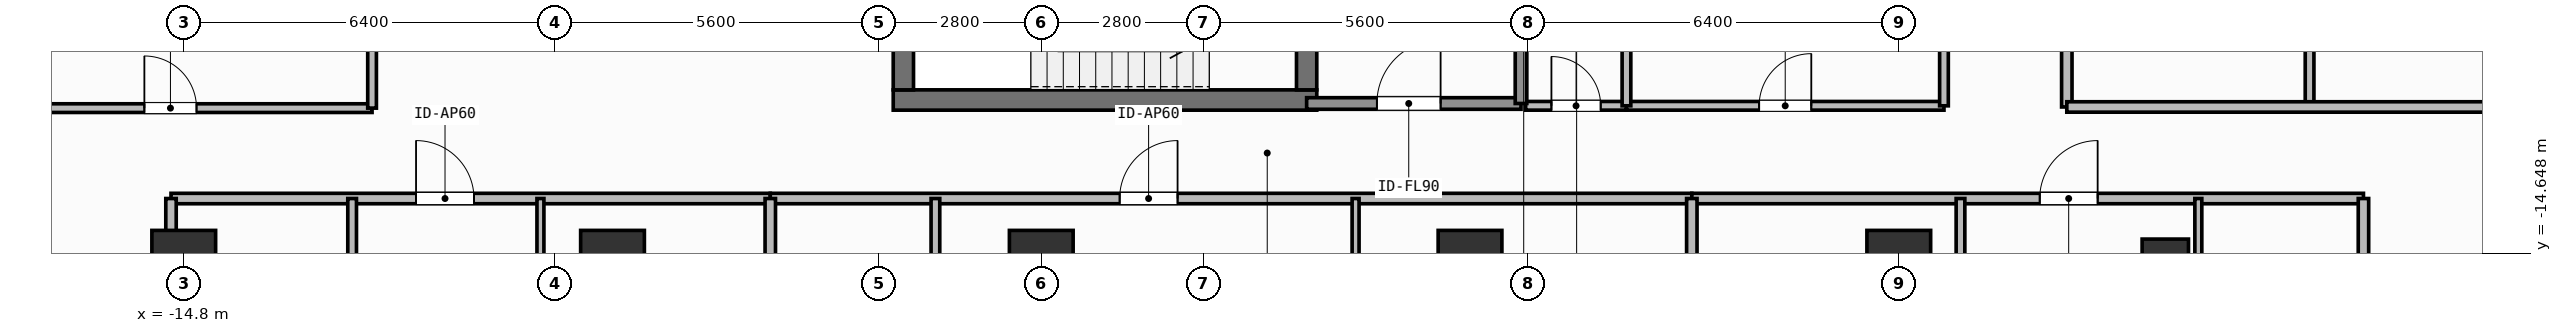
"""IFC4 building model, lengths in metres.
Left out: names, types, materials, properties, quantities, classifications, styles, units other than length and angle.
Written with IfcOpenShell. Run it as: python <this file> out.ifc"""

import sys

from ifc_helpers import new_model, si_unit, direction, frame, frame_2d, origin, origin_2d, place, context, subcontext, project, spatial, rectangle, hollow_rectangle, extrude, element, fill, save


model = new_model("IFC4")
c1 = context("Model", 3, precision=1e-05, world=origin(), true_north=direction((0.0, 1.0)))
c2 = subcontext(c1, "Body", "Model", "MODEL_VIEW")
j1 = project(units=[si_unit("LENGTHUNIT", "METRE"), si_unit("PLANEANGLEUNIT", "RADIAN")], contexts=[c1])
p1 = place(None, origin())
s1 = spatial("IfcSite", under=j1, at=p1, CompositionType="ELEMENT")
p2 = place(p1, origin())
s2 = spatial("IfcBuilding", under=s1, at=p2, CompositionType="ELEMENT")
p3 = place(p2, frame((0.0, 0.0, 227.4)))
s3 = spatial("IfcBuildingStorey", under=s2, at=p3, CompositionType="ELEMENT", Elevation=227.4)
p4 = place(p3, frame((-2.555, -12.0, 0.0), z_axis=(0.0, 0.0, 1.0), x_axis=(1.0, 0.0, 0.0)))
e1 = element("IfcWall", 1, at=p4, inside=s3, PredefinedType="SHEAR", context=c2, shape_type="SweptSolid", body=[
    extrude(rectangle(XDim=7.31, YDim=0.35, at=frame_2d((3.655, 0.0))), origin(), (0.0, 0.0, 1.0), 3.9),
])
p5 = place(p3, frame((-2.38, -11.825, 0.0), z_axis=(0.0, 0.0, 1.0), x_axis=(0.0, 1.0, 0.0)))
e2 = element("IfcWall", 2, at=p5, inside=s3, PredefinedType="SHEAR", context=c2, shape_type="SweptSolid", body=[
    extrude(rectangle(XDim=2.925, YDim=0.35, at=frame_2d((1.462, 0.0))), origin(), (0.0, 0.0, 1.0), 3.9),
])
p6 = place(p3, frame((4.58, -8.9, 0.0), z_axis=(0.0, 0.0, 1.0), x_axis=(0.0, -1.0, 0.0)))
e3 = element("IfcWall", 3, at=p6, inside=s3, PredefinedType="SHEAR", context=c2, shape_type="SweptSolid", body=[
    extrude(rectangle(XDim=2.925, YDim=0.35, at=frame_2d((1.462, 0.0))), origin(), (0.0, 0.0, 1.0), 3.9),
])
p7 = place(p6, frame((0.913, 0.0, 0.0)))
e4 = element("IfcOpeningElement", 4, at=p7, cuts=e3, PredefinedType="OPENING", context=c2, shape_type="SweptSolid", body=[
    extrude(rectangle(XDim=1.1, YDim=2.15, at=frame_2d((0.55, 1.075))), frame((0.0, 0.185, 0.0), z_axis=(0.0, -1.0, 0.0), x_axis=(1.0, 0.0, 0.0)), (0.0, 0.0, 1.0), 0.37),
])
for number, where, z_axis, x_axis in (
    (5, (-14.8, -14.8, 0.0), (0.0, 0.0, 1.0), (1.0, 0.0, 0.0)),
    (6, (-7.4, -14.8, 0.0), (0.0, 0.0, 1.0), (1.0, 0.0, 0.0)),
    (7, (0.0, -14.8, 0.0), (0.0, 0.0, 1.0), (1.0, 0.0, 0.0)),
    (8, (7.4, -14.8, 0.0), (0.0, 0.0, 1.0), (1.0, 0.0, 0.0)),
    (9, (14.8, -14.8, 0.0), (0.0, 0.0, 1.0), (1.0, 0.0, 0.0)),
):
    element("IfcColumn", number, at=place(p3, frame(where, z_axis=z_axis, x_axis=x_axis)), inside=s3, PredefinedType="COLUMN", context=c2, shape_type="SweptSolid", body=[
        extrude(rectangle(XDim=1.1, YDim=1.1, at=origin_2d()), origin(), (0.0, 0.0, 1.0), 3.9),
    ])
p8 = place(p3, frame((19.4, -14.8, 0.0), z_axis=(0.0, 0.0, 1.0), x_axis=(1.0, 0.0, 0.0)))
e10 = element("IfcColumn", 10, at=p8, inside=s3, PredefinedType="COLUMN", context=c2, shape_type="SweptSolid", body=[
    extrude(hollow_rectangle(XDim=0.8, YDim=0.8, WallThickness=0.036, at=origin_2d()), origin(), (0.0, 0.0, 1.0), 3.9),
])
p9 = place(p3, frame((4.58, -12.06, 0.0), z_axis=(0.0, 0.0, 1.0), x_axis=(1.0, 0.0, 0.0)))
e11 = element("IfcWall", 11, at=p9, inside=s3, PredefinedType="SOLIDWALL", context=c2, shape_type="SweptSolid", body=[
    extrude(rectangle(XDim=3.7, YDim=0.2, at=frame_2d((1.85, 0.0))), origin(), (0.0, 0.0, 1.0), 3.68),
])
p10 = place(p9, frame((1.212, 0.0, 0.0)))
e12 = element("IfcOpeningElement", 12, at=p10, cuts=e11, PredefinedType="OPENING", context=c2, shape_type="SweptSolid", body=[
    extrude(rectangle(XDim=1.1, YDim=2.15, at=frame_2d((0.55, 1.075))), frame((0.0, 0.11, 0.0), z_axis=(0.0, -1.0, 0.0), x_axis=(1.0, 0.0, 0.0)), (0.0, 0.0, 1.0), 0.22),
])
p11 = place(p3, frame((8.36, -12.1, 0.0), z_axis=(0.0, 0.0, 1.0), x_axis=(1.0, 0.0, 0.0)))
e13 = element("IfcWall", 13, at=p11, inside=s3, PredefinedType="PARTITIONING", context=c2, shape_type="SweptSolid", body=[
    extrude(rectangle(XDim=1.74, YDim=0.15, at=frame_2d((0.87, 0.0))), origin(), (0.0, 0.0, 1.0), 3.68),
])
p12 = place(p11, frame((0.445, 0.0, 0.0)))
e14 = element("IfcOpeningElement", 14, at=p12, cuts=e13, PredefinedType="OPENING", context=c2, shape_type="SweptSolid", body=[
    extrude(rectangle(XDim=0.85, YDim=2.1, at=frame_2d((0.425, 1.05))), frame((0.0, 0.085, 0.0), z_axis=(0.0, -1.0, 0.0), x_axis=(1.0, 0.0, 0.0)), (0.0, 0.0, 1.0), 0.17),
])
p13 = place(p3, frame((10.1, -12.1, 0.0), z_axis=(0.0, 0.0, 1.0), x_axis=(1.0, 0.0, 0.0)))
e15 = element("IfcWall", 15, at=p13, inside=s3, PredefinedType="PARTITIONING", context=c2, shape_type="SweptSolid", body=[
    extrude(rectangle(XDim=5.48, YDim=0.15, at=frame_2d((2.74, 0.0))), origin(), (0.0, 0.0, 1.0), 3.68),
])
p14 = place(p13, frame((2.29, 0.0, 0.0)))
e16 = element("IfcOpeningElement", 16, at=p14, cuts=e15, PredefinedType="OPENING", context=c2, shape_type="SweptSolid", body=[
    extrude(rectangle(XDim=0.9, YDim=2.1, at=frame_2d((0.45, 1.05))), frame((0.0, 0.085, 0.0), z_axis=(0.0, -1.0, 0.0), x_axis=(1.0, 0.0, 0.0)), (0.0, 0.0, 1.0), 0.17),
])
p15 = place(p3, frame((-15.02, -13.7, 0.0), z_axis=(0.0, 0.0, 1.0), x_axis=(1.0, 0.0, 0.0)))
e17 = element("IfcWall", 17, at=p15, inside=s3, PredefinedType="PARTITIONING", context=c2, shape_type="SweptSolid", body=[
    extrude(rectangle(XDim=10.343, YDim=0.18, at=frame_2d((5.171, 0.0))), origin(), (0.0, 0.0, 1.0), 3.68),
])
p16 = place(p15, frame((4.229, 0.0, 0.0)))
e18 = element("IfcOpeningElement", 18, at=p16, cuts=e17, PredefinedType="OPENING", context=c2, shape_type="SweptSolid", body=[
    extrude(rectangle(XDim=1.0, YDim=2.2, at=frame_2d((0.5, 1.1))), frame((0.0, 0.1, 0.0), z_axis=(0.0, -1.0, 0.0), x_axis=(1.0, 0.0, 0.0)), (0.0, 0.0, 1.0), 0.2),
])
p17 = place(p3, frame((-11.894, -24.39, 0.0), z_axis=(0.0, 0.0, 1.0), x_axis=(0.0, 1.0, 0.0)))
e19 = element("IfcWall", 19, at=p17, inside=s3, PredefinedType="PARTITIONING", context=c2, shape_type="SweptSolid", body=[
    extrude(rectangle(XDim=10.69, YDim=0.15, at=frame_2d((5.345, 0.0))), origin(), (0.0, 0.0, 1.0), 3.68),
])
p18 = place(p17, frame((4.83, 0.0, 0.0)))
e20 = element("IfcOpeningElement", 20, at=p18, cuts=e19, PredefinedType="OPENING", context=c2, shape_type="SweptSolid", body=[
    extrude(rectangle(XDim=0.85, YDim=2.1, at=frame_2d((0.425, 1.05))), frame((0.0, 0.085, 0.0), z_axis=(0.0, -1.0, 0.0), x_axis=(1.0, 0.0, 0.0)), (0.0, 0.0, 1.0), 0.17),
])
p19 = place(p3, frame((-8.644, -18.19, 0.0), z_axis=(0.0, 0.0, 1.0), x_axis=(0.0, 1.0, 0.0)))
e21 = element("IfcWall", 21, at=p19, inside=s3, PredefinedType="PARTITIONING", context=c2, shape_type="SweptSolid", body=[
    extrude(rectangle(XDim=4.49, YDim=0.12, at=frame_2d((2.245, 0.0))), origin(), (0.0, 0.0, 1.0), 3.68),
])
p20 = place(p19, frame((1.907, 0.0, 0.0)))
e22 = element("IfcOpeningElement", 22, at=p20, cuts=e21, PredefinedType="OPENING", context=c2, shape_type="SweptSolid", body=[
    extrude(rectangle(XDim=0.85, YDim=2.1, at=frame_2d((0.425, 1.05))), frame((0.0, 0.07, 0.0), z_axis=(0.0, -1.0, 0.0), x_axis=(1.0, 0.0, 0.0)), (0.0, 0.0, 1.0), 0.14),
])
p21 = place(p3, frame((-4.677, -13.7, 0.0), z_axis=(0.0, 0.0, 1.0), x_axis=(1.0, 0.0, 0.0)))
e23 = element("IfcWall", 23, at=p21, inside=s3, PredefinedType="PARTITIONING", context=c2, shape_type="SweptSolid", body=[
    extrude(rectangle(XDim=15.905, YDim=0.18, at=frame_2d((7.953, 0.0))), origin(), (0.0, 0.0, 1.0), 3.68),
])
p22 = place(p21, frame((6.03, 0.0, 0.0)))
e24 = element("IfcOpeningElement", 24, at=p22, cuts=e23, PredefinedType="OPENING", context=c2, shape_type="SweptSolid", body=[
    extrude(rectangle(XDim=1.0, YDim=2.2, at=frame_2d((0.5, 1.1))), frame((0.0, 0.1, 0.0), z_axis=(0.0, -1.0, 0.0), x_axis=(1.0, 0.0, 0.0)), (0.0, 0.0, 1.0), 0.2),
])
p23 = place(p3, frame((-1.827, -24.39, 0.0), z_axis=(0.0, 0.0, 1.0), x_axis=(0.0, 1.0, 0.0)))
e25 = element("IfcWall", 25, at=p23, inside=s3, PredefinedType="PARTITIONING", context=c2, shape_type="SweptSolid", body=[
    extrude(rectangle(XDim=10.69, YDim=0.15, at=frame_2d((5.345, 0.0))), origin(), (0.0, 0.0, 1.0), 3.68),
])
p24 = place(p23, frame((4.83, 0.0, 0.0)))
e26 = element("IfcOpeningElement", 26, at=p24, cuts=e25, PredefinedType="OPENING", context=c2, shape_type="SweptSolid", body=[
    extrude(rectangle(XDim=0.85, YDim=2.1, at=frame_2d((0.425, 1.05))), frame((0.0, 0.085, 0.0), z_axis=(0.0, -1.0, 0.0), x_axis=(1.0, 0.0, 0.0)), (0.0, 0.0, 1.0), 0.17),
])
p25 = place(p3, frame((5.425, -18.19, 0.0), z_axis=(0.0, 0.0, 1.0), x_axis=(0.0, 1.0, 0.0)))
e27 = element("IfcWall", 27, at=p25, inside=s3, PredefinedType="PARTITIONING", context=c2, shape_type="SweptSolid", body=[
    extrude(rectangle(XDim=4.49, YDim=0.12, at=frame_2d((2.245, 0.0))), origin(), (0.0, 0.0, 1.0), 3.68),
])
p26 = place(p25, frame((1.907, 0.0, 0.0)))
e28 = element("IfcOpeningElement", 28, at=p26, cuts=e27, PredefinedType="OPENING", context=c2, shape_type="SweptSolid", body=[
    extrude(rectangle(XDim=0.85, YDim=2.1, at=frame_2d((0.425, 1.05))), frame((0.0, 0.07, 0.0), z_axis=(0.0, -1.0, 0.0), x_axis=(1.0, 0.0, 0.0)), (0.0, 0.0, 1.0), 0.14),
])
p27 = place(p3, frame((11.228, -13.7, 0.0), z_axis=(0.0, 0.0, 1.0), x_axis=(1.0, 0.0, 0.0)))
e29 = element("IfcWall", 29, at=p27, inside=s3, PredefinedType="PARTITIONING", context=c2, shape_type="SweptSolid", body=[
    extrude(rectangle(XDim=11.592, YDim=0.18, at=frame_2d((5.796, 0.0))), origin(), (0.0, 0.0, 1.0), 3.68),
])
p28 = place(p27, frame((6.004, 0.0, 0.0)))
e30 = element("IfcOpeningElement", 30, at=p28, cuts=e29, PredefinedType="OPENING", context=c2, shape_type="SweptSolid", body=[
    extrude(rectangle(XDim=1.0, YDim=2.2, at=frame_2d((0.5, 1.1))), frame((0.0, 0.1, 0.0), z_axis=(0.0, -1.0, 0.0), x_axis=(1.0, 0.0, 0.0)), (0.0, 0.0, 1.0), 0.2),
])
p29 = place(p3, frame((15.865, -18.19, 0.0), z_axis=(0.0, 0.0, 1.0), x_axis=(0.0, 1.0, 0.0)))
e31 = element("IfcWall", 31, at=p29, inside=s3, PredefinedType="PARTITIONING", context=c2, shape_type="SweptSolid", body=[
    extrude(rectangle(XDim=4.49, YDim=0.15, at=frame_2d((2.245, 0.0))), origin(), (0.0, 0.0, 1.0), 3.68),
])
p30 = place(p29, frame((1.907, 0.0, 0.0)))
e32 = element("IfcOpeningElement", 32, at=p30, cuts=e31, PredefinedType="OPENING", context=c2, shape_type="SweptSolid", body=[
    extrude(rectangle(XDim=0.85, YDim=2.1, at=frame_2d((0.425, 1.05))), frame((0.0, 0.085, 0.0), z_axis=(0.0, -1.0, 0.0), x_axis=(1.0, 0.0, 0.0)), (0.0, 0.0, 1.0), 0.17),
])
p31 = place(p3, frame((19.97, -21.183, 0.0), z_axis=(0.0, 0.0, 1.0), x_axis=(0.0, 1.0, 0.0)))
e33 = element("IfcWall", 33, at=p31, inside=s3, PredefinedType="PARTITIONING", context=c2, shape_type="SweptSolid", body=[
    extrude(rectangle(XDim=7.483, YDim=0.12, at=frame_2d((3.742, 0.0))), origin(), (0.0, 0.0, 1.0), 3.68),
])
p32 = place(p31, frame((3.316, 0.0, 0.0)))
e34 = element("IfcOpeningElement", 34, at=p32, cuts=e33, PredefinedType="OPENING", context=c2, shape_type="SweptSolid", body=[
    extrude(rectangle(XDim=0.85, YDim=2.1, at=frame_2d((0.425, 1.05))), frame((0.0, 0.07, 0.0), z_axis=(0.0, -1.0, 0.0), x_axis=(1.0, 0.0, 0.0)), (0.0, 0.0, 1.0), 0.14),
])
p33 = place(p3, frame((-18.33, -12.14, 0.0), z_axis=(0.0, 0.0, 1.0), x_axis=(1.0, 0.0, 0.0)))
e35 = element("IfcWall", 35, at=p33, inside=s3, PredefinedType="PARTITIONING", context=c2, shape_type="SweptSolid", body=[
    extrude(rectangle(XDim=6.78, YDim=0.15, at=frame_2d((3.39, 0.0))), origin(), (0.0, 0.0, 1.0), 3.68),
])
p34 = place(p33, frame((2.85, 0.0, 0.0)))
e36 = element("IfcOpeningElement", 36, at=p34, cuts=e35, PredefinedType="OPENING", context=c2, shape_type="SweptSolid", body=[
    extrude(rectangle(XDim=0.9, YDim=2.1, at=frame_2d((0.45, 1.05))), frame((0.0, 0.085, 0.0), z_axis=(0.0, -1.0, 0.0), x_axis=(1.0, 0.0, 0.0)), (0.0, 0.0, 1.0), 0.17),
])
p35 = place(p3, frame((17.7, -12.12, 0.0), z_axis=(0.0, 0.0, 1.0), x_axis=(0.0, 1.0, 0.0)))
e37 = element("IfcWall", 37, at=p35, inside=s3, PredefinedType="PARTITIONING", context=c2, shape_type="SweptSolid", body=[
    extrude(rectangle(XDim=10.927, YDim=0.18, at=frame_2d((5.463, 0.0))), origin(), (0.0, 0.0, 1.0), 3.68),
])
p36 = place(p35, frame((5.319, 0.0, 0.0)))
e38 = element("IfcOpeningElement", 38, at=p36, cuts=e37, PredefinedType="OPENING", context=c2, shape_type="SweptSolid", body=[
    extrude(rectangle(XDim=1.0, YDim=2.2, at=frame_2d((0.5, 1.1))), frame((0.0, 0.1, 0.0), z_axis=(0.0, -1.0, 0.0), x_axis=(1.0, 0.0, 0.0)), (0.0, 0.0, 1.0), 0.2),
])
p37 = place(p3, frame((8.28, -12.06, 0.0), z_axis=(0.0, 0.0, 1.0), x_axis=(0.0, 1.0, 0.0)))
e39 = element("IfcWall", 39, at=p37, inside=s3, PredefinedType="SOLIDWALL", context=c2, shape_type="SweptSolid", body=[
    extrude(rectangle(XDim=3.26, YDim=0.2, at=frame_2d((1.63, 0.0))), origin(), (0.0, 0.0, 1.0), 3.68),
])
p38 = place(p3, frame((10.1, -12.1, 0.0), z_axis=(0.0, 0.0, 1.0), x_axis=(0.0, 1.0, 0.0)))
e40 = element("IfcWall", 40, at=p38, inside=s3, PredefinedType="PARTITIONING", context=c2, shape_type="SweptSolid", body=[
    extrude(rectangle(XDim=2.35, YDim=0.15, at=frame_2d((1.175, 0.0))), origin(), (0.0, 0.0, 1.0), 3.68),
])
p39 = place(p3, frame((15.58, -12.1, 0.0), z_axis=(0.0, 0.0, 1.0), x_axis=(0.0, 1.0, 0.0)))
e41 = element("IfcWall", 41, at=p39, inside=s3, PredefinedType="PARTITIONING", context=c2, shape_type="SweptSolid", body=[
    extrude(rectangle(XDim=6.25, YDim=0.15, at=frame_2d((3.125, 0.0))), origin(), (0.0, 0.0, 1.0), 3.68),
])
p40 = place(p3, frame((-4.677, -28.63, 0.0), z_axis=(0.0, 0.0, 1.0), x_axis=(0.0, 1.0, 0.0)))
e42 = element("IfcWall", 42, at=p40, inside=s3, PredefinedType="PARTITIONING", context=c2, shape_type="SweptSolid", body=[
    extrude(rectangle(XDim=14.93, YDim=0.18, at=frame_2d((7.465, 0.0))), origin(), (0.0, 0.0, 1.0), 3.68),
])
p41 = place(p3, frame((11.228, -28.63, 0.0), z_axis=(0.0, 0.0, 1.0), x_axis=(0.0, 1.0, 0.0)))
e43 = element("IfcWall", 43, at=p41, inside=s3, PredefinedType="PARTITIONING", context=c2, shape_type="SweptSolid", body=[
    extrude(rectangle(XDim=14.93, YDim=0.18, at=frame_2d((7.465, 0.0))), origin(), (0.0, 0.0, 1.0), 3.42),
])
for number, where, z_axis, x_axis in (
    (44, (-15.02, -27.51, 0.0), (0.0, 0.0, 1.0), (0.0, 1.0, 0.0)),
    (45, (22.82, -27.51, 0.0), (0.0, 0.0, 1.0), (0.0, 1.0, 0.0)),
):
    element("IfcWall", number, at=place(p3, frame(where, z_axis=z_axis, x_axis=x_axis)), inside=s3, PredefinedType="PARTITIONING", context=c2, shape_type="SweptSolid", body=[
        extrude(rectangle(XDim=13.81, YDim=0.18, at=frame_2d((6.905, 0.0))), origin(), (0.0, 0.0, 1.0), 3.68),
    ])
p42 = place(p3, frame((-11.55, -12.14, 0.0), z_axis=(0.0, 0.0, 1.0), x_axis=(0.0, 1.0, 0.0)))
e46 = element("IfcWall", 46, at=p42, inside=s3, PredefinedType="PARTITIONING", context=c2, shape_type="SweptSolid", body=[
    extrude(rectangle(XDim=13.94, YDim=0.15, at=frame_2d((6.97, 0.0))), origin(), (0.0, 0.0, 1.0), 3.68),
])
p43 = place(p3, frame((21.89, -12.12, 0.0), z_axis=(0.0, 0.0, 1.0), x_axis=(0.0, 1.0, 0.0)))
e47 = element("IfcWall", 47, at=p43, inside=s3, PredefinedType="PARTITIONING", context=c2, shape_type="SweptSolid", body=[
    extrude(rectangle(XDim=2.8, YDim=0.15, at=frame_2d((1.4, 0.0))), origin(), (0.0, 0.0, 1.0), 3.68),
])
p44 = place(p3, frame((17.7, -12.12, 0.0), z_axis=(0.0, 0.0, 1.0), x_axis=(1.0, 0.0, 0.0)))
e48 = element("IfcWall", 48, at=p44, inside=s3, PredefinedType="PARTITIONING", context=c2, shape_type="SweptSolid", body=[
    extrude(rectangle(XDim=8.43, YDim=0.18, at=frame_2d((4.215, 0.0))), origin(), (0.0, 0.0, 1.0), 3.68),
])
p45 = place(p10, origin())
e49 = element("IfcDoor", 49, at=p45, inside=s3, OperationType="SINGLE_SWING_RIGHT", PredefinedType="DOOR", context=c2, shape_type="SweptSolid", body=[
    extrude(rectangle(XDim=1.1, YDim=2.15, at=frame_2d((0.55, 1.075))), frame((0.0, 0.025, 0.0), z_axis=(0.0, -1.0, 0.0), x_axis=(1.0, 0.0, 0.0)), (0.0, 0.0, 1.0), 0.05),
])
fill(e12, e49)
p46 = place(p12, origin())
e50 = element("IfcDoor", 50, at=p46, inside=s3, OperationType="SINGLE_SWING_LEFT", PredefinedType="DOOR", context=c2, shape_type="SweptSolid", body=[
    extrude(rectangle(XDim=0.85, YDim=2.1, at=frame_2d((0.425, 1.05))), frame((0.0, 0.025, 0.0), z_axis=(0.0, -1.0, 0.0), x_axis=(1.0, 0.0, 0.0)), (0.0, 0.0, 1.0), 0.05),
])
fill(e14, e50)
p47 = place(p14, origin())
e51 = element("IfcDoor", 51, at=p47, inside=s3, OperationType="SINGLE_SWING_RIGHT", PredefinedType="DOOR", context=c2, shape_type="SweptSolid", body=[
    extrude(rectangle(XDim=0.9, YDim=2.1, at=frame_2d((0.45, 1.05))), frame((0.0, 0.025, 0.0), z_axis=(0.0, -1.0, 0.0), x_axis=(1.0, 0.0, 0.0)), (0.0, 0.0, 1.0), 0.05),
])
fill(e16, e51)
p48 = place(p16, origin())
e52 = element("IfcDoor", 52, at=p48, inside=s3, OperationType="SINGLE_SWING_LEFT", PredefinedType="DOOR", context=c2, shape_type="SweptSolid", body=[
    extrude(rectangle(XDim=1.0, YDim=2.2, at=frame_2d((0.5, 1.1))), frame((0.0, 0.025, 0.0), z_axis=(0.0, -1.0, 0.0), x_axis=(1.0, 0.0, 0.0)), (0.0, 0.0, 1.0), 0.05),
])
fill(e18, e52)
p49 = place(p22, origin())
e53 = element("IfcDoor", 53, at=p49, inside=s3, OperationType="SINGLE_SWING_RIGHT", PredefinedType="DOOR", context=c2, shape_type="SweptSolid", body=[
    extrude(rectangle(XDim=1.0, YDim=2.2, at=frame_2d((0.5, 1.1))), frame((0.0, 0.025, 0.0), z_axis=(0.0, -1.0, 0.0), x_axis=(1.0, 0.0, 0.0)), (0.0, 0.0, 1.0), 0.05),
])
fill(e24, e53)
p50 = place(p28, origin())
e54 = element("IfcDoor", 54, at=p50, inside=s3, OperationType="SINGLE_SWING_RIGHT", PredefinedType="DOOR", context=c2, shape_type="SweptSolid", body=[
    extrude(rectangle(XDim=1.0, YDim=2.2, at=frame_2d((0.5, 1.1))), frame((0.0, 0.025, 0.0), z_axis=(0.0, -1.0, 0.0), x_axis=(1.0, 0.0, 0.0)), (0.0, 0.0, 1.0), 0.05),
])
fill(e30, e54)
p51 = place(p34, origin())
e55 = element("IfcDoor", 55, at=p51, inside=s3, OperationType="SINGLE_SWING_LEFT", PredefinedType="DOOR", context=c2, shape_type="SweptSolid", body=[
    extrude(rectangle(XDim=0.9, YDim=2.1, at=frame_2d((0.45, 1.05))), frame((0.0, 0.025, 0.0), z_axis=(0.0, -1.0, 0.0), x_axis=(1.0, 0.0, 0.0)), (0.0, 0.0, 1.0), 0.05),
])
fill(e36, e55)
save(model, sys.argv[1])
